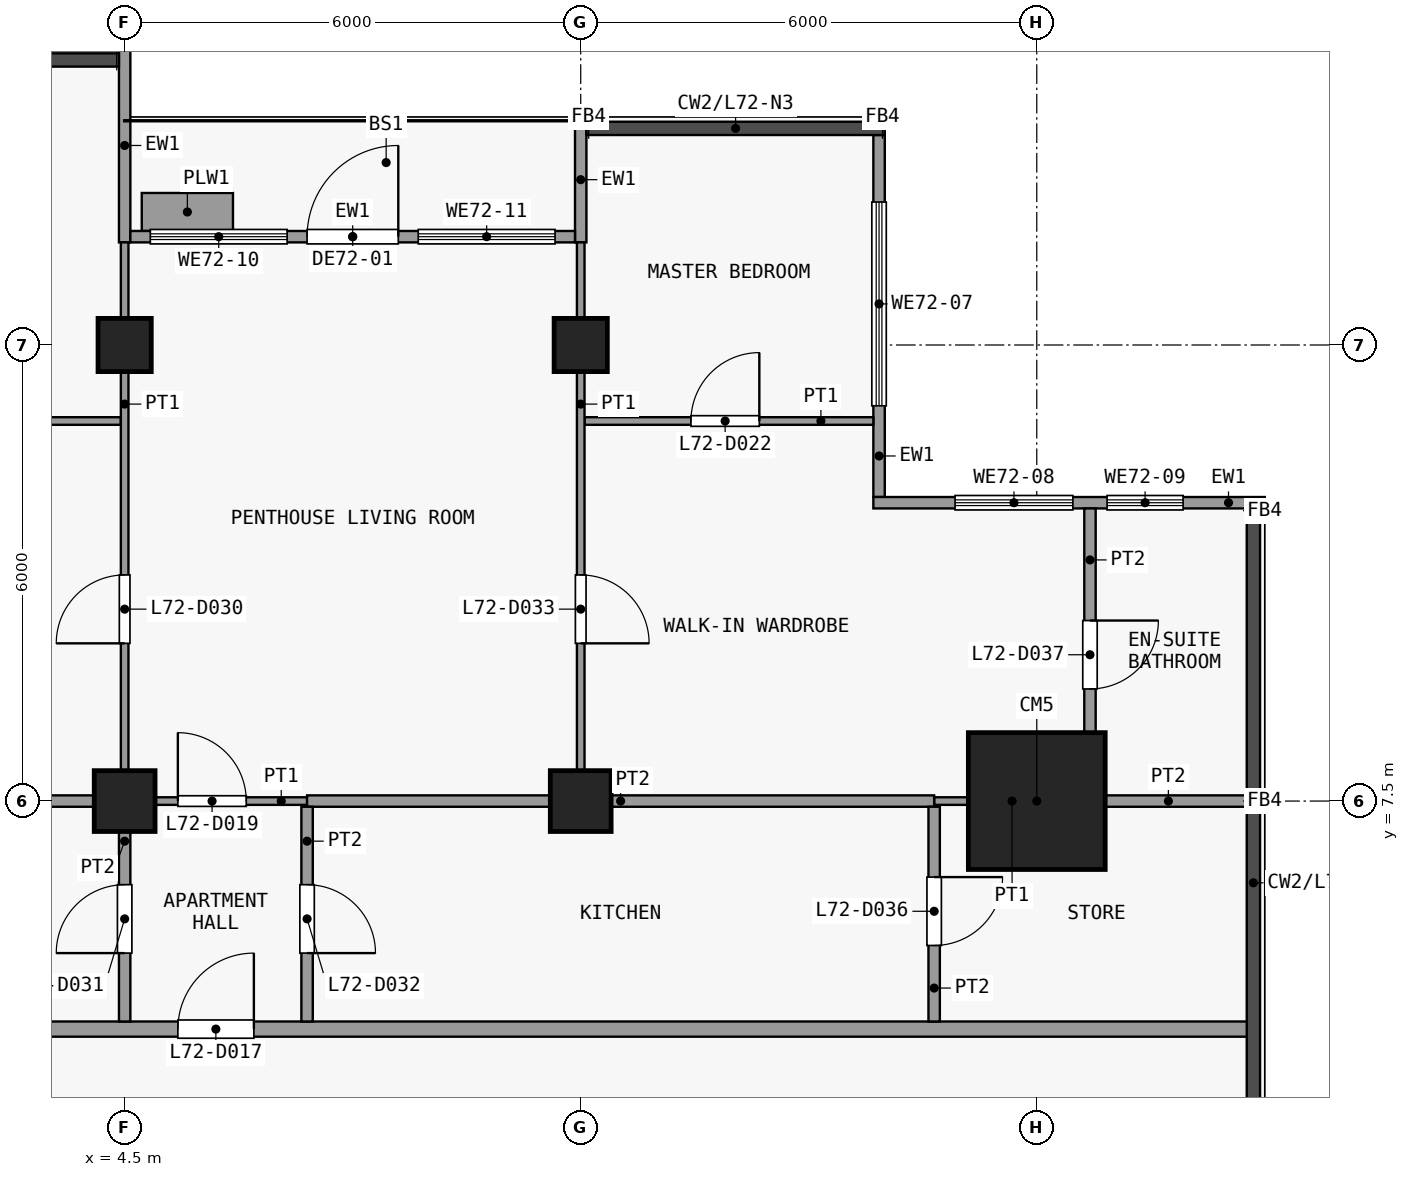
"""IFC4 building model, lengths in metres.
Left out: names, types, materials, properties, quantities, classifications, styles, units other than length and angle.
Written with IfcOpenShell. Run it as: python <this file> out.ifc"""

import sys

from ifc_helpers import new_model, si_unit, direction, frame, frame_2d, origin, origin_2d, place, context, subcontext, project, spatial, rectangle, extrude, element, fill, save


model = new_model("IFC4")
c1 = context("Model", 3, precision=1e-05, world=origin(), true_north=direction((0.0, 1.0)))
c2 = subcontext(c1, "Body", "Model", "MODEL_VIEW")
j1 = project(units=[si_unit("LENGTHUNIT", "METRE"), si_unit("PLANEANGLEUNIT", "RADIAN")], contexts=[c1])
p1 = place(None, origin())
s1 = spatial("IfcSite", under=j1, at=p1, CompositionType="ELEMENT")
p2 = place(p1, origin())
s2 = spatial("IfcBuilding", under=s1, at=p2, CompositionType="ELEMENT")
p3 = place(p2, frame((0.0, 0.0, 284.3)))
s3 = spatial("IfcBuildingStorey", under=s2, at=p3, CompositionType="ELEMENT", Elevation=284.3)
p4 = place(p3, frame((4.5, 7.5, 0.0), z_axis=(0.0, 0.0, 1.0), x_axis=(1.0, 0.0, 0.0)))
e1 = element("IfcColumn", 1, at=p4, inside=s3, PredefinedType="COLUMN", context=c2, shape_type="SweptSolid", body=[
    extrude(rectangle(XDim=0.8, YDim=0.8, at=origin_2d()), origin(), (0.0, 0.0, 1.0), 3.6),
])
p5 = place(p3, frame((4.5, 13.5, 0.0), z_axis=(0.0, 0.0, 1.0), x_axis=(1.0, 0.0, 0.0)))
e2 = element("IfcColumn", 2, at=p5, inside=s3, PredefinedType="COLUMN", context=c2, shape_type="SweptSolid", body=[
    extrude(rectangle(XDim=0.7, YDim=0.7, at=origin_2d()), origin(), (0.0, 0.0, 1.0), 3.6),
])
p6 = place(p3, frame((10.5, 7.5, 0.0), z_axis=(0.0, 0.0, 1.0), x_axis=(1.0, 0.0, 0.0)))
e3 = element("IfcColumn", 3, at=p6, inside=s3, PredefinedType="COLUMN", context=c2, shape_type="SweptSolid", body=[
    extrude(rectangle(XDim=0.8, YDim=0.8, at=origin_2d()), origin(), (0.0, 0.0, 1.0), 3.6),
])
p7 = place(p3, frame((10.5, 13.5, 0.0), z_axis=(0.0, 0.0, 1.0), x_axis=(1.0, 0.0, 0.0)))
e4 = element("IfcColumn", 4, at=p7, inside=s3, PredefinedType="COLUMN", context=c2, shape_type="SweptSolid", body=[
    extrude(rectangle(XDim=0.7, YDim=0.7, at=origin_2d()), origin(), (0.0, 0.0, 1.0), 3.6),
])
p8 = place(p3, frame((16.5, 7.5, 0.0), z_axis=(0.0, 0.0, 1.0), x_axis=(1.0, 0.0, 0.0)))
e5 = element("IfcColumn", 5, at=p8, inside=s3, PredefinedType="COLUMN", context=c2, shape_type="SweptSolid", body=[
    extrude(rectangle(XDim=1.8, YDim=1.8, at=origin_2d()), origin(), (0.0, 0.0, 1.0), 3.6),
])
p9 = place(p3, frame((14.425, 16.262, 0.0), z_axis=(0.0, 0.0, 1.0), x_axis=(0.0, -1.0, 0.0)))
e6 = element("IfcWall", 6, at=p9, inside=s3, PredefinedType="SOLIDWALL", context=c2, shape_type="SweptSolid", body=[
    extrude(rectangle(XDim=4.762, YDim=0.15, at=frame_2d((2.381, 0.0))), origin(), (0.0, 0.0, 1.0), 3.3),
])
p10 = place(p9, frame((0.881, 0.0, 0.9)))
e7 = element("IfcOpeningElement", 7, at=p10, cuts=e6, PredefinedType="OPENING", context=c2, shape_type="SweptSolid", body=[
    extrude(rectangle(XDim=2.681, YDim=2.4, at=frame_2d((1.34, 1.2))), frame((0.0, 0.085, 0.0), z_axis=(0.0, -1.0, 0.0), x_axis=(1.0, 0.0, 0.0)), (0.0, 0.0, 1.0), 0.17),
])
p11 = place(p3, frame((14.35, 11.425, 0.0), z_axis=(0.0, 0.0, 1.0), x_axis=(1.0, 0.0, 0.0)))
e8 = element("IfcWall", 8, at=p11, inside=s3, PredefinedType="SOLIDWALL", context=c2, shape_type="SweptSolid", body=[
    extrude(rectangle(XDim=5.15, YDim=0.15, at=frame_2d((2.575, 0.0))), origin(), (0.0, 0.0, 1.0), 3.3),
])
p12 = place(p11, frame((1.075, 0.0, 0.9)))
e9 = element("IfcOpeningElement", 9, at=p12, cuts=e8, PredefinedType="OPENING", context=c2, shape_type="SweptSolid", body=[
    extrude(rectangle(XDim=1.55, YDim=2.4, at=frame_2d((0.775, 1.2))), frame((0.0, 0.085, 0.0), z_axis=(0.0, -1.0, 0.0), x_axis=(1.0, 0.0, 0.0)), (0.0, 0.0, 1.0), 0.17),
])
p13 = place(p11, frame((3.075, 0.0, 0.9)))
e10 = element("IfcOpeningElement", 10, at=p13, cuts=e8, PredefinedType="OPENING", context=c2, shape_type="SweptSolid", body=[
    extrude(rectangle(XDim=1.0, YDim=2.4, at=frame_2d((0.5, 1.2))), frame((0.0, 0.085, 0.0), z_axis=(0.0, -1.0, 0.0), x_axis=(1.0, 0.0, 0.0)), (0.0, 0.0, 1.0), 0.17),
])
p14 = place(p3, frame((4.5, 14.85, 0.0), z_axis=(0.0, 0.0, 1.0), x_axis=(0.0, 1.0, 0.0)))
e11 = element("IfcWall", 11, at=p14, inside=s3, PredefinedType="SOLIDWALL", context=c2, shape_type="SweptSolid", body=[
    extrude(rectangle(XDim=2.55, YDim=0.15, at=frame_2d((1.275, 0.0))), origin(), (0.0, 0.0, 1.0), 3.3),
])
p15 = place(p3, frame((10.5, 14.85, 0.0), z_axis=(0.0, 0.0, 1.0), x_axis=(0.0, 1.0, 0.0)))
e12 = element("IfcWall", 12, at=p15, inside=s3, PredefinedType="SOLIDWALL", context=c2, shape_type="SweptSolid", body=[
    extrude(rectangle(XDim=1.65, YDim=0.15, at=frame_2d((0.825, 0.0))), origin(), (0.0, 0.0, 1.0), 3.3),
])
p16 = place(p3, frame((4.575, 14.925, 0.0), z_axis=(0.0, 0.0, 1.0), x_axis=(1.0, 0.0, 0.0)))
e13 = element("IfcWall", 13, at=p16, inside=s3, PredefinedType="SOLIDWALL", context=c2, shape_type="SweptSolid", body=[
    extrude(rectangle(XDim=5.85, YDim=0.15, at=frame_2d((2.925, 0.0))), origin(), (0.0, 0.0, 1.0), 3.3),
])
p17 = place(p16, frame((2.325, 0.0, 0.0)))
e14 = element("IfcOpeningElement", 14, at=p17, cuts=e13, PredefinedType="OPENING", context=c2, shape_type="SweptSolid", body=[
    extrude(rectangle(XDim=1.2, YDim=2.4, at=frame_2d((0.6, 1.2))), frame((0.0, 0.085, 0.0), z_axis=(0.0, -1.0, 0.0), x_axis=(1.0, 0.0, 0.0)), (0.0, 0.0, 1.0), 0.17),
])
p18 = place(p16, frame((0.262, 0.0, 0.9)))
e15 = element("IfcOpeningElement", 15, at=p18, cuts=e13, PredefinedType="OPENING", context=c2, shape_type="SweptSolid", body=[
    extrude(rectangle(XDim=1.8, YDim=2.1, at=frame_2d((0.9, 1.05))), frame((0.0, 0.085, 0.0), z_axis=(0.0, -1.0, 0.0), x_axis=(1.0, 0.0, 0.0)), (0.0, 0.0, 1.0), 0.17),
])
p19 = place(p16, frame((3.788, 0.0, 0.9)))
e16 = element("IfcOpeningElement", 16, at=p19, cuts=e13, PredefinedType="OPENING", context=c2, shape_type="SweptSolid", body=[
    extrude(rectangle(XDim=1.8, YDim=2.1, at=frame_2d((0.9, 1.05))), frame((0.0, 0.085, 0.0), z_axis=(0.0, -1.0, 0.0), x_axis=(1.0, 0.0, 0.0)), (0.0, 0.0, 1.0), 0.17),
])
p20 = place(p3, frame((4.725, 15.25, 0.0), z_axis=(0.0, 0.0, 1.0), x_axis=(1.0, 0.0, 0.0)))
e17 = element("IfcWall", 17, at=p20, inside=s3, PredefinedType="USERDEFINED", context=c2, shape_type="SweptSolid", body=[
    extrude(rectangle(XDim=1.2, YDim=0.5, at=frame_2d((0.6, 0.0))), origin(), (0.0, 0.0, 1.0), 0.9),
])
p21 = place(p3, frame((-19.35, 4.5, 0.0), z_axis=(0.0, 0.0, 1.0), x_axis=(1.0, 0.0, 0.0)))
e18 = element("IfcWall", 18, at=p21, inside=s3, PredefinedType="PARTITIONING", context=c2, shape_type="SweptSolid", body=[
    extrude(rectangle(XDim=38.7, YDim=0.2, at=frame_2d((19.35, 0.0))), origin(), (0.0, 0.0, 1.0), 3.3),
])
p22 = place(p21, frame((7.05, 0.0, 0.0)))
e19 = element("IfcOpeningElement", 19, at=p22, cuts=e18, PredefinedType="OPENING", context=c2, shape_type="SweptSolid", body=[
    extrude(rectangle(XDim=1.0, YDim=2.1, at=frame_2d((0.5, 1.05))), frame((0.0, 0.11, 0.0), z_axis=(0.0, -1.0, 0.0), x_axis=(1.0, 0.0, 0.0)), (0.0, 0.0, 1.0), 0.22),
])
p23 = place(p21, frame((24.55, 0.0, 0.0)))
e20 = element("IfcOpeningElement", 20, at=p23, cuts=e18, PredefinedType="OPENING", context=c2, shape_type="SweptSolid", body=[
    extrude(rectangle(XDim=1.0, YDim=2.1, at=frame_2d((0.5, 1.05))), frame((0.0, 0.11, 0.0), z_axis=(0.0, -1.0, 0.0), x_axis=(1.0, 0.0, 0.0)), (0.0, 0.0, 1.0), 0.22),
])
p24 = place(p3, frame((4.5, 7.5, 0.0), z_axis=(0.0, 0.0, 1.0), x_axis=(1.0, 0.0, 0.0)))
e21 = element("IfcWall", 21, at=p24, inside=s3, PredefinedType="PARTITIONING", context=c2, shape_type="SweptSolid", body=[
    extrude(rectangle(XDim=2.4, YDim=0.1, at=frame_2d((1.2, 0.0))), origin(), (0.0, 0.0, 1.0), 3.3),
])
p25 = place(p24, frame((0.7, 0.0, 0.0)))
e22 = element("IfcOpeningElement", 22, at=p25, cuts=e21, PredefinedType="OPENING", context=c2, shape_type="SweptSolid", body=[
    extrude(rectangle(XDim=0.9, YDim=2.1, at=frame_2d((0.45, 1.05))), frame((0.0, 0.06, 0.0), z_axis=(0.0, -1.0, 0.0), x_axis=(1.0, 0.0, 0.0)), (0.0, 0.0, 1.0), 0.12),
])
p26 = place(p3, frame((15.15, 7.5, 0.0), z_axis=(0.0, 0.0, 1.0), x_axis=(1.0, 0.0, 0.0)))
e23 = element("IfcWall", 23, at=p26, inside=s3, PredefinedType="PARTITIONING", context=c2, shape_type="SweptSolid", body=[
    extrude(rectangle(XDim=2.05, YDim=0.1, at=frame_2d((1.025, 0.0))), origin(), (0.0, 0.0, 1.0), 3.3),
])
p27 = place(p3, frame((0.0, 7.5, 0.0), z_axis=(0.0, 0.0, 1.0), x_axis=(1.0, 0.0, 0.0)))
e24 = element("IfcWall", 24, at=p27, inside=s3, PredefinedType="PARTITIONING", context=c2, shape_type="SweptSolid", body=[
    extrude(rectangle(XDim=4.5, YDim=0.15, at=frame_2d((2.25, 0.0))), origin(), (0.0, 0.0, 1.0), 3.3),
])
p28 = place(p3, frame((6.9, 7.5, 0.0), z_axis=(0.0, 0.0, 1.0), x_axis=(1.0, 0.0, 0.0)))
e25 = element("IfcWall", 25, at=p28, inside=s3, PredefinedType="PARTITIONING", context=c2, shape_type="SweptSolid", body=[
    extrude(rectangle(XDim=8.25, YDim=0.15, at=frame_2d((4.125, 0.0))), origin(), (0.0, 0.0, 1.0), 3.3),
])
p29 = place(p3, frame((17.2, 7.5, 0.0), z_axis=(0.0, 0.0, 1.0), x_axis=(1.0, 0.0, 0.0)))
e26 = element("IfcWall", 26, at=p29, inside=s3, PredefinedType="PARTITIONING", context=c2, shape_type="SweptSolid", body=[
    extrude(rectangle(XDim=2.062, YDim=0.15, at=frame_2d((1.031, 0.0))), origin(), (0.0, 0.0, 1.0), 3.3),
])
p30 = place(p3, frame((-4.4, 12.5, 0.0), z_axis=(0.0, 0.0, 1.0), x_axis=(1.0, 0.0, 0.0)))
e27 = element("IfcWall", 27, at=p30, inside=s3, PredefinedType="PARTITIONING", context=c2, shape_type="SweptSolid", body=[
    extrude(rectangle(XDim=8.85, YDim=0.1, at=frame_2d((4.425, 0.0))), origin(), (0.0, 0.0, 1.0), 3.3),
])
p31 = place(p30, frame((4.0, 0.0, 0.0)))
e28 = element("IfcOpeningElement", 28, at=p31, cuts=e27, PredefinedType="OPENING", context=c2, shape_type="SweptSolid", body=[
    extrude(rectangle(XDim=0.9, YDim=2.1, at=frame_2d((0.45, 1.05))), frame((0.0, 0.06, 0.0), z_axis=(0.0, -1.0, 0.0), x_axis=(1.0, 0.0, 0.0)), (0.0, 0.0, 1.0), 0.12),
])
p32 = place(p3, frame((10.55, 12.5, 0.0), z_axis=(0.0, 0.0, 1.0), x_axis=(1.0, 0.0, 0.0)))
e29 = element("IfcWall", 29, at=p32, inside=s3, PredefinedType="PARTITIONING", context=c2, shape_type="SweptSolid", body=[
    extrude(rectangle(XDim=3.8, YDim=0.1, at=frame_2d((1.9, 0.0))), origin(), (0.0, 0.0, 1.0), 3.3),
])
p33 = place(p32, frame((1.4, 0.0, 0.0)))
e30 = element("IfcOpeningElement", 30, at=p33, cuts=e29, PredefinedType="OPENING", context=c2, shape_type="SweptSolid", body=[
    extrude(rectangle(XDim=0.9, YDim=2.1, at=frame_2d((0.45, 1.05))), frame((0.0, 0.06, 0.0), z_axis=(0.0, -1.0, 0.0), x_axis=(1.0, 0.0, 0.0)), (0.0, 0.0, 1.0), 0.12),
])
p34 = place(p3, frame((4.5, 7.575, 0.0), z_axis=(0.0, 0.0, 1.0), x_axis=(0.0, 1.0, 0.0)))
e31 = element("IfcWall", 31, at=p34, inside=s3, PredefinedType="PARTITIONING", context=c2, shape_type="SweptSolid", body=[
    extrude(rectangle(XDim=7.275, YDim=0.1, at=frame_2d((3.638, 0.0))), origin(), (0.0, 0.0, 1.0), 3.3),
])
p35 = place(p34, frame((2.0, 0.0, 0.0)))
e32 = element("IfcOpeningElement", 32, at=p35, cuts=e31, PredefinedType="OPENING", context=c2, shape_type="SweptSolid", body=[
    extrude(rectangle(XDim=0.9, YDim=2.1, at=frame_2d((0.45, 1.05))), frame((0.0, 0.06, 0.0), z_axis=(0.0, -1.0, 0.0), x_axis=(1.0, 0.0, 0.0)), (0.0, 0.0, 1.0), 0.12),
])
p36 = place(p3, frame((4.5, 4.6, 0.0), z_axis=(0.0, 0.0, 1.0), x_axis=(0.0, 1.0, 0.0)))
e33 = element("IfcWall", 33, at=p36, inside=s3, PredefinedType="PARTITIONING", context=c2, shape_type="SweptSolid", body=[
    extrude(rectangle(XDim=2.825, YDim=0.15, at=frame_2d((1.413, 0.0))), origin(), (0.0, 0.0, 1.0), 3.3),
])
p37 = place(p36, frame((0.9, 0.0, 0.0)))
e34 = element("IfcOpeningElement", 34, at=p37, cuts=e33, PredefinedType="OPENING", context=c2, shape_type="SweptSolid", body=[
    extrude(rectangle(XDim=0.9, YDim=2.1, at=frame_2d((0.45, 1.05))), frame((0.0, 0.085, 0.0), z_axis=(0.0, -1.0, 0.0), x_axis=(1.0, 0.0, 0.0)), (0.0, 0.0, 1.0), 0.17),
])
p38 = place(p3, frame((6.9, 4.6, 0.0), z_axis=(0.0, 0.0, 1.0), x_axis=(0.0, 1.0, 0.0)))
e35 = element("IfcWall", 35, at=p38, inside=s3, PredefinedType="PARTITIONING", context=c2, shape_type="SweptSolid", body=[
    extrude(rectangle(XDim=2.825, YDim=0.15, at=frame_2d((1.413, 0.0))), origin(), (0.0, 0.0, 1.0), 3.3),
])
p39 = place(p38, frame((0.9, 0.0, 0.0)))
e36 = element("IfcOpeningElement", 36, at=p39, cuts=e35, PredefinedType="OPENING", context=c2, shape_type="SweptSolid", body=[
    extrude(rectangle(XDim=0.9, YDim=2.1, at=frame_2d((0.45, 1.05))), frame((0.0, 0.085, 0.0), z_axis=(0.0, -1.0, 0.0), x_axis=(1.0, 0.0, 0.0)), (0.0, 0.0, 1.0), 0.17),
])
p40 = place(p3, frame((10.5, 7.575, 0.0), z_axis=(0.0, 0.0, 1.0), x_axis=(0.0, 1.0, 0.0)))
e37 = element("IfcWall", 37, at=p40, inside=s3, PredefinedType="PARTITIONING", context=c2, shape_type="SweptSolid", body=[
    extrude(rectangle(XDim=7.275, YDim=0.1, at=frame_2d((3.638, 0.0))), origin(), (0.0, 0.0, 1.0), 3.3),
])
p41 = place(p40, frame((2.0, 0.0, 0.0)))
e38 = element("IfcOpeningElement", 38, at=p41, cuts=e37, PredefinedType="OPENING", context=c2, shape_type="SweptSolid", body=[
    extrude(rectangle(XDim=0.9, YDim=2.1, at=frame_2d((0.45, 1.05))), frame((0.0, 0.06, 0.0), z_axis=(0.0, -1.0, 0.0), x_axis=(1.0, 0.0, 0.0)), (0.0, 0.0, 1.0), 0.12),
])
p42 = place(p3, frame((15.15, 4.6, 0.0), z_axis=(0.0, 0.0, 1.0), x_axis=(0.0, 1.0, 0.0)))
e39 = element("IfcWall", 39, at=p42, inside=s3, PredefinedType="PARTITIONING", context=c2, shape_type="SweptSolid", body=[
    extrude(rectangle(XDim=2.825, YDim=0.15, at=frame_2d((1.413, 0.0))), origin(), (0.0, 0.0, 1.0), 3.3),
])
p43 = place(p42, frame((1.0, 0.0, 0.0)))
e40 = element("IfcOpeningElement", 40, at=p43, cuts=e39, PredefinedType="OPENING", context=c2, shape_type="SweptSolid", body=[
    extrude(rectangle(XDim=0.9, YDim=2.1, at=frame_2d((0.45, 1.05))), frame((0.0, 0.085, 0.0), z_axis=(0.0, -1.0, 0.0), x_axis=(1.0, 0.0, 0.0)), (0.0, 0.0, 1.0), 0.17),
])
p44 = place(p3, frame((17.2, 7.575, 0.0), z_axis=(0.0, 0.0, 1.0), x_axis=(0.0, 1.0, 0.0)))
e41 = element("IfcWall", 41, at=p44, inside=s3, PredefinedType="PARTITIONING", context=c2, shape_type="SweptSolid", body=[
    extrude(rectangle(XDim=3.775, YDim=0.15, at=frame_2d((1.888, 0.0))), origin(), (0.0, 0.0, 1.0), 3.3),
])
p45 = place(p44, frame((1.4, 0.0, 0.0)))
e42 = element("IfcOpeningElement", 42, at=p45, cuts=e41, PredefinedType="OPENING", context=c2, shape_type="SweptSolid", body=[
    extrude(rectangle(XDim=0.9, YDim=2.1, at=frame_2d((0.45, 1.05))), frame((0.0, 0.085, 0.0), z_axis=(0.0, -1.0, 0.0), x_axis=(1.0, 0.0, 0.0)), (0.0, 0.0, 1.0), 0.17),
])
p46 = place(p10, origin())
e43 = element("IfcWindow", 43, at=p46, inside=s3, PartitioningType="SINGLE_PANEL", PredefinedType="WINDOW", context=c2, shape_type="SweptSolid", body=[
    extrude(rectangle(XDim=2.681, YDim=2.4, at=frame_2d((1.34, 1.2))), frame((0.0, 0.03, 0.0), z_axis=(0.0, -1.0, 0.0), x_axis=(1.0, 0.0, 0.0)), (0.0, 0.0, 1.0), 0.06),
])
fill(e7, e43)
p47 = place(p12, origin())
e44 = element("IfcWindow", 44, at=p47, inside=s3, PartitioningType="SINGLE_PANEL", PredefinedType="WINDOW", context=c2, shape_type="SweptSolid", body=[
    extrude(rectangle(XDim=1.55, YDim=2.4, at=frame_2d((0.775, 1.2))), frame((0.0, 0.03, 0.0), z_axis=(0.0, -1.0, 0.0), x_axis=(1.0, 0.0, 0.0)), (0.0, 0.0, 1.0), 0.06),
])
fill(e9, e44)
p48 = place(p13, origin())
e45 = element("IfcWindow", 45, at=p48, inside=s3, PartitioningType="SINGLE_PANEL", PredefinedType="WINDOW", context=c2, shape_type="SweptSolid", body=[
    extrude(rectangle(XDim=1.0, YDim=2.4, at=frame_2d((0.5, 1.2))), frame((0.0, 0.03, 0.0), z_axis=(0.0, -1.0, 0.0), x_axis=(1.0, 0.0, 0.0)), (0.0, 0.0, 1.0), 0.06),
])
fill(e10, e45)
p49 = place(p17, origin())
e46 = element("IfcDoor", 46, at=p49, inside=s3, OperationType="SINGLE_SWING_RIGHT", PredefinedType="DOOR", context=c2, shape_type="SweptSolid", body=[
    extrude(rectangle(XDim=1.2, YDim=2.4, at=frame_2d((0.6, 1.2))), frame((0.0, 0.025, 0.0), z_axis=(0.0, -1.0, 0.0), x_axis=(1.0, 0.0, 0.0)), (0.0, 0.0, 1.0), 0.05),
])
fill(e14, e46)
p50 = place(p18, origin())
e47 = element("IfcWindow", 47, at=p50, inside=s3, PartitioningType="SINGLE_PANEL", PredefinedType="WINDOW", context=c2, shape_type="SweptSolid", body=[
    extrude(rectangle(XDim=1.8, YDim=2.1, at=frame_2d((0.9, 1.05))), frame((0.0, 0.03, 0.0), z_axis=(0.0, -1.0, 0.0), x_axis=(1.0, 0.0, 0.0)), (0.0, 0.0, 1.0), 0.06),
])
fill(e15, e47)
p51 = place(p19, origin())
e48 = element("IfcWindow", 48, at=p51, inside=s3, PartitioningType="SINGLE_PANEL", PredefinedType="WINDOW", context=c2, shape_type="SweptSolid", body=[
    extrude(rectangle(XDim=1.8, YDim=2.1, at=frame_2d((0.9, 1.05))), frame((0.0, 0.03, 0.0), z_axis=(0.0, -1.0, 0.0), x_axis=(1.0, 0.0, 0.0)), (0.0, 0.0, 1.0), 0.06),
])
fill(e16, e48)
p52 = place(p23, origin())
e49 = element("IfcDoor", 49, at=p52, inside=s3, OperationType="SINGLE_SWING_LEFT", PredefinedType="DOOR", context=c2, shape_type="SweptSolid", body=[
    extrude(rectangle(XDim=1.0, YDim=2.1, at=frame_2d((0.5, 1.05))), frame((0.0, 0.025, 0.0), z_axis=(0.0, -1.0, 0.0), x_axis=(1.0, 0.0, 0.0)), (0.0, 0.0, 1.0), 0.05),
])
fill(e20, e49)
p53 = place(p25, origin())
e50 = element("IfcDoor", 50, at=p53, inside=s3, OperationType="SINGLE_SWING_RIGHT", PredefinedType="DOOR", context=c2, shape_type="SweptSolid", body=[
    extrude(rectangle(XDim=0.9, YDim=2.1, at=frame_2d((0.45, 1.05))), frame((0.0, 0.025, 0.0), z_axis=(0.0, -1.0, 0.0), x_axis=(1.0, 0.0, 0.0)), (0.0, 0.0, 1.0), 0.05),
])
fill(e22, e50)
p54 = place(p33, origin())
e51 = element("IfcDoor", 51, at=p54, inside=s3, OperationType="SINGLE_SWING_LEFT", PredefinedType="DOOR", context=c2, shape_type="SweptSolid", body=[
    extrude(rectangle(XDim=0.9, YDim=2.1, at=frame_2d((0.45, 1.05))), frame((0.0, 0.025, 0.0), z_axis=(0.0, -1.0, 0.0), x_axis=(1.0, 0.0, 0.0)), (0.0, 0.0, 1.0), 0.05),
])
fill(e30, e51)
p55 = place(p35, origin())
e52 = element("IfcDoor", 52, at=p55, inside=s3, OperationType="SINGLE_SWING_RIGHT", PredefinedType="DOOR", context=c2, shape_type="SweptSolid", body=[
    extrude(rectangle(XDim=0.9, YDim=2.1, at=frame_2d((0.45, 1.05))), frame((0.0, 0.025, 0.0), z_axis=(0.0, -1.0, 0.0), x_axis=(1.0, 0.0, 0.0)), (0.0, 0.0, 1.0), 0.05),
])
fill(e32, e52)
p56 = place(p37, origin())
e53 = element("IfcDoor", 53, at=p56, inside=s3, OperationType="SINGLE_SWING_RIGHT", PredefinedType="DOOR", context=c2, shape_type="SweptSolid", body=[
    extrude(rectangle(XDim=0.9, YDim=2.1, at=frame_2d((0.45, 1.05))), frame((0.0, 0.025, 0.0), z_axis=(0.0, -1.0, 0.0), x_axis=(1.0, 0.0, 0.0)), (0.0, 0.0, 1.0), 0.05),
])
fill(e34, e53)
p57 = place(p39, origin())
e54 = element("IfcDoor", 54, at=p57, inside=s3, OperationType="SINGLE_SWING_LEFT", PredefinedType="DOOR", context=c2, shape_type="SweptSolid", body=[
    extrude(rectangle(XDim=0.9, YDim=2.1, at=frame_2d((0.45, 1.05))), frame((0.0, 0.025, 0.0), z_axis=(0.0, -1.0, 0.0), x_axis=(1.0, 0.0, 0.0)), (0.0, 0.0, 1.0), 0.05),
])
fill(e36, e54)
p58 = place(p41, origin())
e55 = element("IfcDoor", 55, at=p58, inside=s3, OperationType="SINGLE_SWING_LEFT", PredefinedType="DOOR", context=c2, shape_type="SweptSolid", body=[
    extrude(rectangle(XDim=0.9, YDim=2.1, at=frame_2d((0.45, 1.05))), frame((0.0, 0.025, 0.0), z_axis=(0.0, -1.0, 0.0), x_axis=(1.0, 0.0, 0.0)), (0.0, 0.0, 1.0), 0.05),
])
fill(e38, e55)
p59 = place(p43, origin())
e56 = element("IfcDoor", 56, at=p59, inside=s3, OperationType="SINGLE_SWING_RIGHT", PredefinedType="DOOR", context=c2, shape_type="SweptSolid", body=[
    extrude(rectangle(XDim=0.9, YDim=2.1, at=frame_2d((0.45, 1.05))), frame((0.0, 0.025, 0.0), z_axis=(0.0, -1.0, 0.0), x_axis=(1.0, 0.0, 0.0)), (0.0, 0.0, 1.0), 0.05),
])
fill(e40, e56)
p60 = place(p45, origin())
e57 = element("IfcDoor", 57, at=p60, inside=s3, OperationType="SINGLE_SWING_RIGHT", PredefinedType="DOOR", context=c2, shape_type="SweptSolid", body=[
    extrude(rectangle(XDim=0.9, YDim=2.1, at=frame_2d((0.45, 1.05))), frame((0.0, 0.025, 0.0), z_axis=(0.0, -1.0, 0.0), x_axis=(1.0, 0.0, 0.0)), (0.0, 0.0, 1.0), 0.05),
])
fill(e42, e57)
save(model, sys.argv[1])
